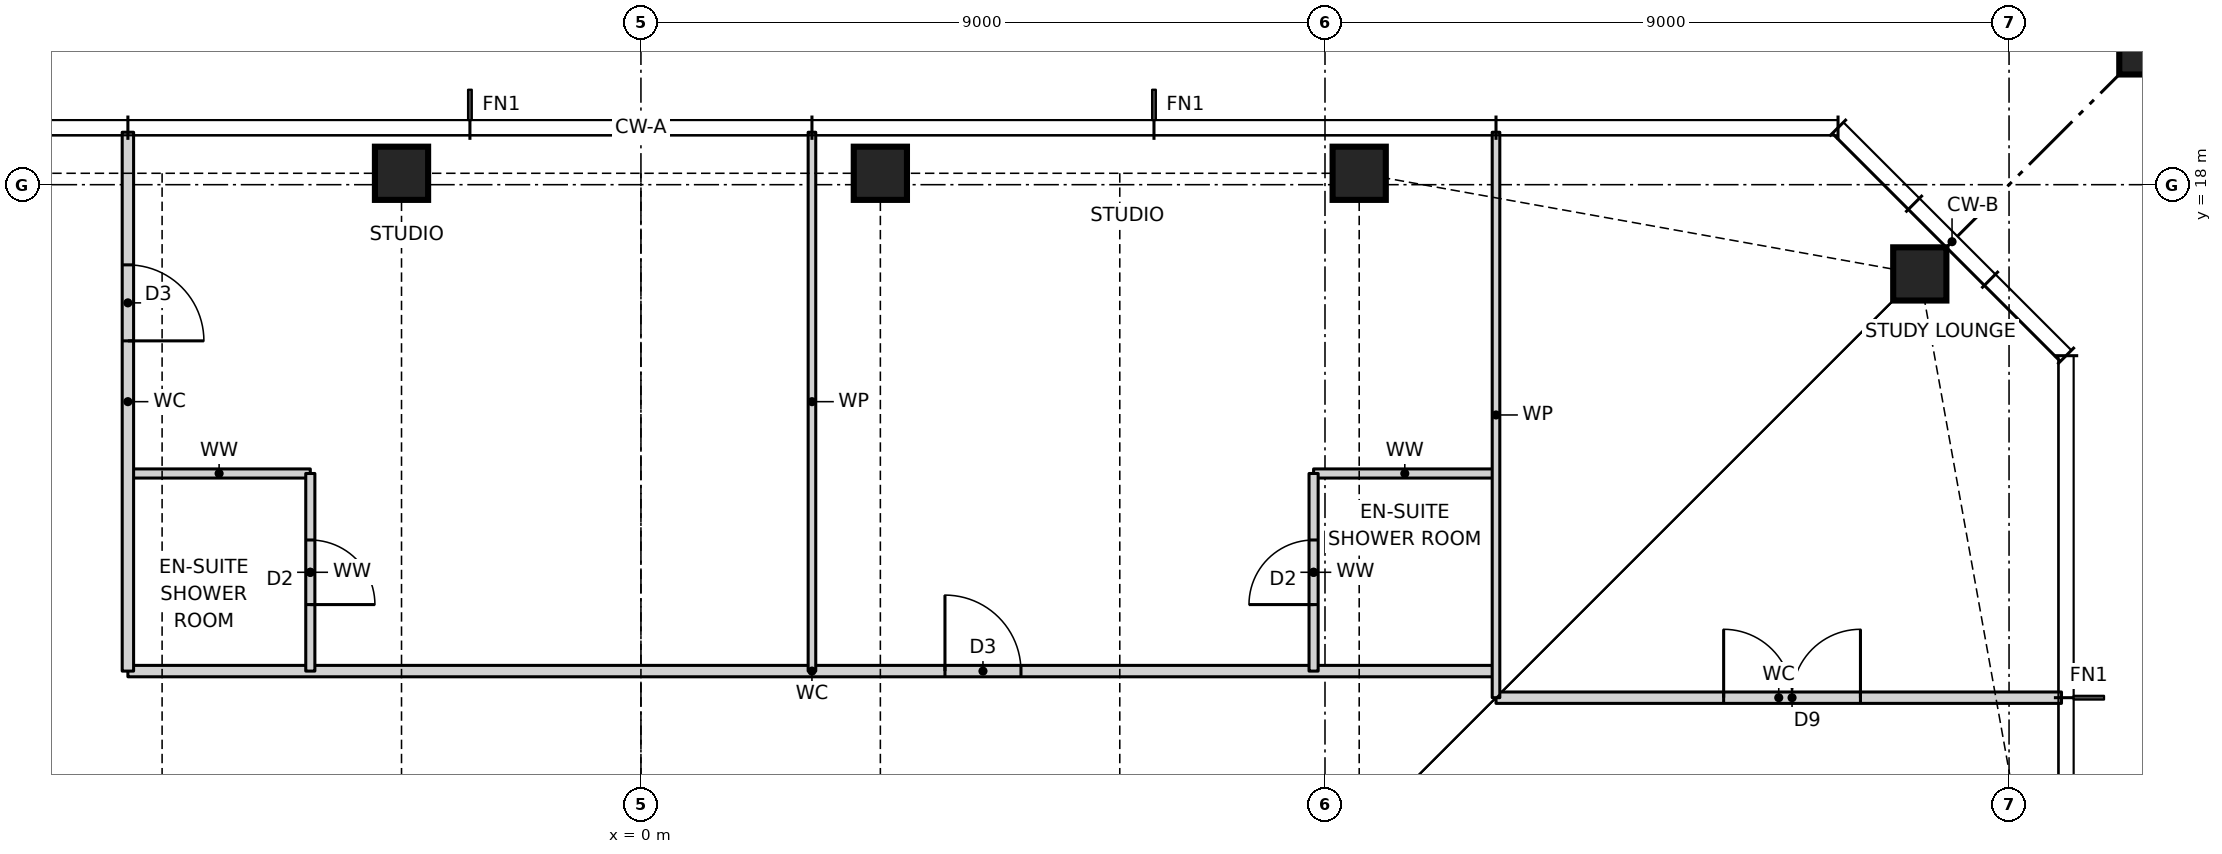
"""IFC4 building model, lengths in metres.
Left out: names, types, materials, properties, quantities, classifications, styles, units other than length and angle.
Written with IfcOpenShell. Run it as: python <this file> out.ifc"""

import sys

from ifc_helpers import new_model, si_unit, direction, frame, frame_2d, origin, origin_2d, place, context, subcontext, project, spatial, rectangle, hollow_rectangle, i_section, extrude, element, fill, save


model = new_model("IFC4")
c1 = context("Model", 3, precision=1e-05, world=origin(), true_north=direction((0.0, 1.0)))
c2 = subcontext(c1, "Body", "Model", "MODEL_VIEW")
j1 = project(units=[si_unit("LENGTHUNIT", "METRE"), si_unit("PLANEANGLEUNIT", "RADIAN")], contexts=[c1])
p1 = place(None, origin())
s1 = spatial("IfcSite", under=j1, at=p1, CompositionType="ELEMENT")
p2 = place(p1, origin())
s2 = spatial("IfcBuilding", under=s1, at=p2, CompositionType="ELEMENT")
p3 = place(p2, frame((0.0, 0.0, 198.5)))
s3 = spatial("IfcBuildingStorey", under=s2, at=p3, CompositionType="ELEMENT", Elevation=198.5)
for number, where, z_axis, x_axis in (
    (1, (16.826, 16.826, 0.0), (0.0, 0.0, 1.0), (1.0, 0.0, 0.0)),
    (2, (9.45, 18.15, 0.0), (0.0, 0.0, 1.0), (1.0, 0.0, 0.0)),
    (3, (3.15, 18.15, 0.0), (0.0, 0.0, 1.0), (1.0, 0.0, 0.0)),
    (4, (-3.15, 18.15, 0.0), (0.0, 0.0, 1.0), (1.0, 0.0, 0.0)),
):
    element("IfcColumn", number, at=place(p3, frame(where, z_axis=z_axis, x_axis=x_axis)), inside=s3, PredefinedType="COLUMN", context=c2, shape_type="SweptSolid", body=[
        extrude(hollow_rectangle(XDim=0.7, YDim=0.7, WallThickness=0.06, at=origin_2d()), origin(), (0.0, 0.0, 1.0), 3.5),
    ])
p4 = place(p3, frame((21.65, 21.65, 0.0), z_axis=(0.0, 0.0, 1.0), x_axis=(1.0, 0.0, 0.0)))
e5 = element("IfcColumn", 5, at=p4, inside=s3, PredefinedType="COLUMN", context=c2, shape_type="SweptSolid", body=[
    extrude(rectangle(XDim=4.4, YDim=4.4, at=origin_2d()), origin(), (0.0, 0.0, 1.0), 3.5),
    extrude(i_section(OverallWidth=0.478, OverallDepth=0.599, WebThickness=0.1, FlangeThickness=0.14, at=origin_2d()), origin(), (0.0, 0.0, 1.0), 3.5),
])
p5 = place(p3, frame((11.25, 11.25, 0.0), z_axis=(0.0, 0.0, 1.0), x_axis=(1.0, 0.0, 0.0)))
e6 = element("IfcWall", 6, at=p5, inside=s3, PredefinedType="PARTITIONING", context=c2, shape_type="SweptSolid", body=[
    extrude(rectangle(XDim=7.44, YDim=0.15, at=frame_2d((3.72, 0.0))), origin(), (0.0, 0.0, 1.0), 3.27),
])
p6 = place(p5, frame((2.995, 0.0, 0.0)))
e7 = element("IfcOpeningElement", 7, at=p6, cuts=e6, PredefinedType="OPENING", context=c2, shape_type="SweptSolid", body=[
    extrude(rectangle(XDim=1.8, YDim=2.1, at=frame_2d((0.9, 1.05))), frame((0.0, 0.085, 0.0), z_axis=(0.0, -1.0, 0.0), x_axis=(1.0, 0.0, 0.0)), (0.0, 0.0, 1.0), 0.17),
])
p7 = place(p3, frame((-6.75, 11.6, 0.0), z_axis=(0.0, 0.0, 1.0), x_axis=(1.0, 0.0, 0.0)))
e8 = element("IfcWall", 8, at=p7, inside=s3, PredefinedType="PARTITIONING", context=c2, shape_type="SweptSolid", body=[
    extrude(rectangle(XDim=18.0, YDim=0.15, at=frame_2d((9.0, 0.0))), origin(), (0.0, 0.0, 1.0), 3.27),
])
p8 = place(p7, frame((10.75, 0.0, 0.0)))
e9 = element("IfcOpeningElement", 9, at=p8, cuts=e8, PredefinedType="OPENING", context=c2, shape_type="SweptSolid", body=[
    extrude(rectangle(XDim=1.0, YDim=2.1, at=frame_2d((0.5, 1.05))), frame((0.0, 0.085, 0.0), z_axis=(0.0, -1.0, 0.0), x_axis=(1.0, 0.0, 0.0)), (0.0, 0.0, 1.0), 0.17),
])
for number, where, z_axis, x_axis in (
    (10, (-6.75, 14.2, 0.0), (0.0, 0.0, 1.0), (1.0, 0.0, 0.0)),
    (11, (8.85, 14.2, 0.0), (0.0, 0.0, 1.0), (1.0, 0.0, 0.0)),
):
    element("IfcWall", number, at=place(p3, frame(where, z_axis=z_axis, x_axis=x_axis)), inside=s3, PredefinedType="PARTITIONING", context=c2, shape_type="SweptSolid", body=[
        extrude(rectangle(XDim=2.4, YDim=0.12, at=frame_2d((1.2, 0.0))), origin(), (0.0, 0.0, 1.0), 3.27),
    ])
p9 = place(p3, frame((11.25, 11.25, 0.0), z_axis=(0.0, 0.0, 1.0), x_axis=(0.0, 1.0, 0.0)))
e12 = element("IfcWall", 12, at=p9, inside=s3, PredefinedType="PARTITIONING", context=c2, shape_type="SweptSolid", body=[
    extrude(rectangle(XDim=7.44, YDim=0.1, at=frame_2d((3.72, 0.0))), origin(), (0.0, 0.0, 1.0), 3.27),
])
p10 = place(p3, frame((8.85, 11.6, 0.0), z_axis=(0.0, 0.0, 1.0), x_axis=(0.0, 1.0, 0.0)))
e13 = element("IfcWall", 13, at=p10, inside=s3, PredefinedType="PARTITIONING", context=c2, shape_type="SweptSolid", body=[
    extrude(rectangle(XDim=2.6, YDim=0.12, at=frame_2d((1.3, 0.0))), origin(), (0.0, 0.0, 1.0), 3.27),
])
p11 = place(p10, frame((0.875, 0.0, 0.0)))
e14 = element("IfcOpeningElement", 14, at=p11, cuts=e13, PredefinedType="OPENING", context=c2, shape_type="SweptSolid", body=[
    extrude(rectangle(XDim=0.85, YDim=2.1, at=frame_2d((0.425, 1.05))), frame((0.0, 0.07, 0.0), z_axis=(0.0, -1.0, 0.0), x_axis=(1.0, 0.0, 0.0)), (0.0, 0.0, 1.0), 0.14),
])
p12 = place(p3, frame((2.25, 11.6, 0.0), z_axis=(0.0, 0.0, 1.0), x_axis=(0.0, 1.0, 0.0)))
e15 = element("IfcWall", 15, at=p12, inside=s3, PredefinedType="PARTITIONING", context=c2, shape_type="SweptSolid", body=[
    extrude(rectangle(XDim=7.09, YDim=0.1, at=frame_2d((3.545, 0.0))), origin(), (0.0, 0.0, 1.0), 3.27),
])
p13 = place(p3, frame((-4.35, 11.6, 0.0), z_axis=(0.0, 0.0, 1.0), x_axis=(0.0, 1.0, 0.0)))
e16 = element("IfcWall", 16, at=p13, inside=s3, PredefinedType="PARTITIONING", context=c2, shape_type="SweptSolid", body=[
    extrude(rectangle(XDim=2.6, YDim=0.12, at=frame_2d((1.3, 0.0))), origin(), (0.0, 0.0, 1.0), 3.27),
])
p14 = place(p13, frame((0.875, 0.0, 0.0)))
e17 = element("IfcOpeningElement", 17, at=p14, cuts=e16, PredefinedType="OPENING", context=c2, shape_type="SweptSolid", body=[
    extrude(rectangle(XDim=0.85, YDim=2.1, at=frame_2d((0.425, 1.05))), frame((0.0, 0.07, 0.0), z_axis=(0.0, -1.0, 0.0), x_axis=(1.0, 0.0, 0.0)), (0.0, 0.0, 1.0), 0.14),
])
p15 = place(p3, frame((-6.75, 11.6, 0.0), z_axis=(0.0, 0.0, 1.0), x_axis=(0.0, 1.0, 0.0)))
e18 = element("IfcWall", 18, at=p15, inside=s3, PredefinedType="PARTITIONING", context=c2, shape_type="SweptSolid", body=[
    extrude(rectangle(XDim=7.09, YDim=0.15, at=frame_2d((3.545, 0.0))), origin(), (0.0, 0.0, 1.0), 3.27),
])
p16 = place(p15, frame((4.345, 0.0, 0.0)))
e19 = element("IfcOpeningElement", 19, at=p16, cuts=e18, PredefinedType="OPENING", context=c2, shape_type="SweptSolid", body=[
    extrude(rectangle(XDim=1.0, YDim=2.1, at=frame_2d((0.5, 1.05))), frame((0.0, 0.085, 0.0), z_axis=(0.0, -1.0, 0.0), x_axis=(1.0, 0.0, 0.0)), (0.0, 0.0, 1.0), 0.17),
])
p17 = place(p8, origin())
e20 = element("IfcDoor", 20, at=p17, inside=s3, OperationType="SINGLE_SWING_LEFT", PredefinedType="DOOR", context=c2, shape_type="SweptSolid", body=[
    extrude(rectangle(XDim=1.0, YDim=2.1, at=frame_2d((0.5, 1.05))), frame((0.0, 0.025, 0.0), z_axis=(0.0, -1.0, 0.0), x_axis=(1.0, 0.0, 0.0)), (0.0, 0.0, 1.0), 0.05),
])
fill(e9, e20)
p18 = place(p11, origin())
e21 = element("IfcDoor", 21, at=p18, inside=s3, OperationType="SINGLE_SWING_LEFT", PredefinedType="DOOR", context=c2, shape_type="SweptSolid", body=[
    extrude(rectangle(XDim=0.85, YDim=2.1, at=frame_2d((0.425, 1.05))), frame((0.0, 0.025, 0.0), z_axis=(0.0, -1.0, 0.0), x_axis=(1.0, 0.0, 0.0)), (0.0, 0.0, 1.0), 0.05),
])
fill(e14, e21)
p19 = place(p16, frame((1.0, 0.0, 0.0), z_axis=(0.0, 0.0, 1.0), x_axis=(-1.0, 0.0, 0.0)))
e22 = element("IfcDoor", 22, at=p19, inside=s3, OperationType="SINGLE_SWING_RIGHT", PredefinedType="DOOR", context=c2, shape_type="SweptSolid", body=[
    extrude(rectangle(XDim=1.0, YDim=2.1, at=frame_2d((0.5, 1.05))), frame((0.0, 0.025, 0.0), z_axis=(0.0, -1.0, 0.0), x_axis=(1.0, 0.0, 0.0)), (0.0, 0.0, 1.0), 0.05),
])
fill(e19, e22)
p20 = place(p14, frame((0.85, 0.0, 0.0), z_axis=(0.0, 0.0, 1.0), x_axis=(-1.0, 0.0, 0.0)))
e23 = element("IfcDoor", 23, at=p20, inside=s3, OperationType="SINGLE_SWING_RIGHT", PredefinedType="DOOR", context=c2, shape_type="SweptSolid", body=[
    extrude(rectangle(XDim=0.85, YDim=2.1, at=frame_2d((0.425, 1.05))), frame((0.0, 0.025, 0.0), z_axis=(0.0, -1.0, 0.0), x_axis=(1.0, 0.0, 0.0)), (0.0, 0.0, 1.0), 0.05),
])
fill(e17, e23)
p21 = place(p6, origin())
e24 = element("IfcDoor", 24, at=p21, inside=s3, OperationType="DOUBLE_DOOR_SINGLE_SWING", PredefinedType="DOOR", context=c2, shape_type="SweptSolid", body=[
    extrude(rectangle(XDim=1.8, YDim=2.1, at=frame_2d((0.9, 1.05))), frame((0.0, 0.025, 0.0), z_axis=(0.0, -1.0, 0.0), x_axis=(1.0, 0.0, 0.0)), (0.0, 0.0, 1.0), 0.05),
])
fill(e7, e24)
save(model, sys.argv[1])
